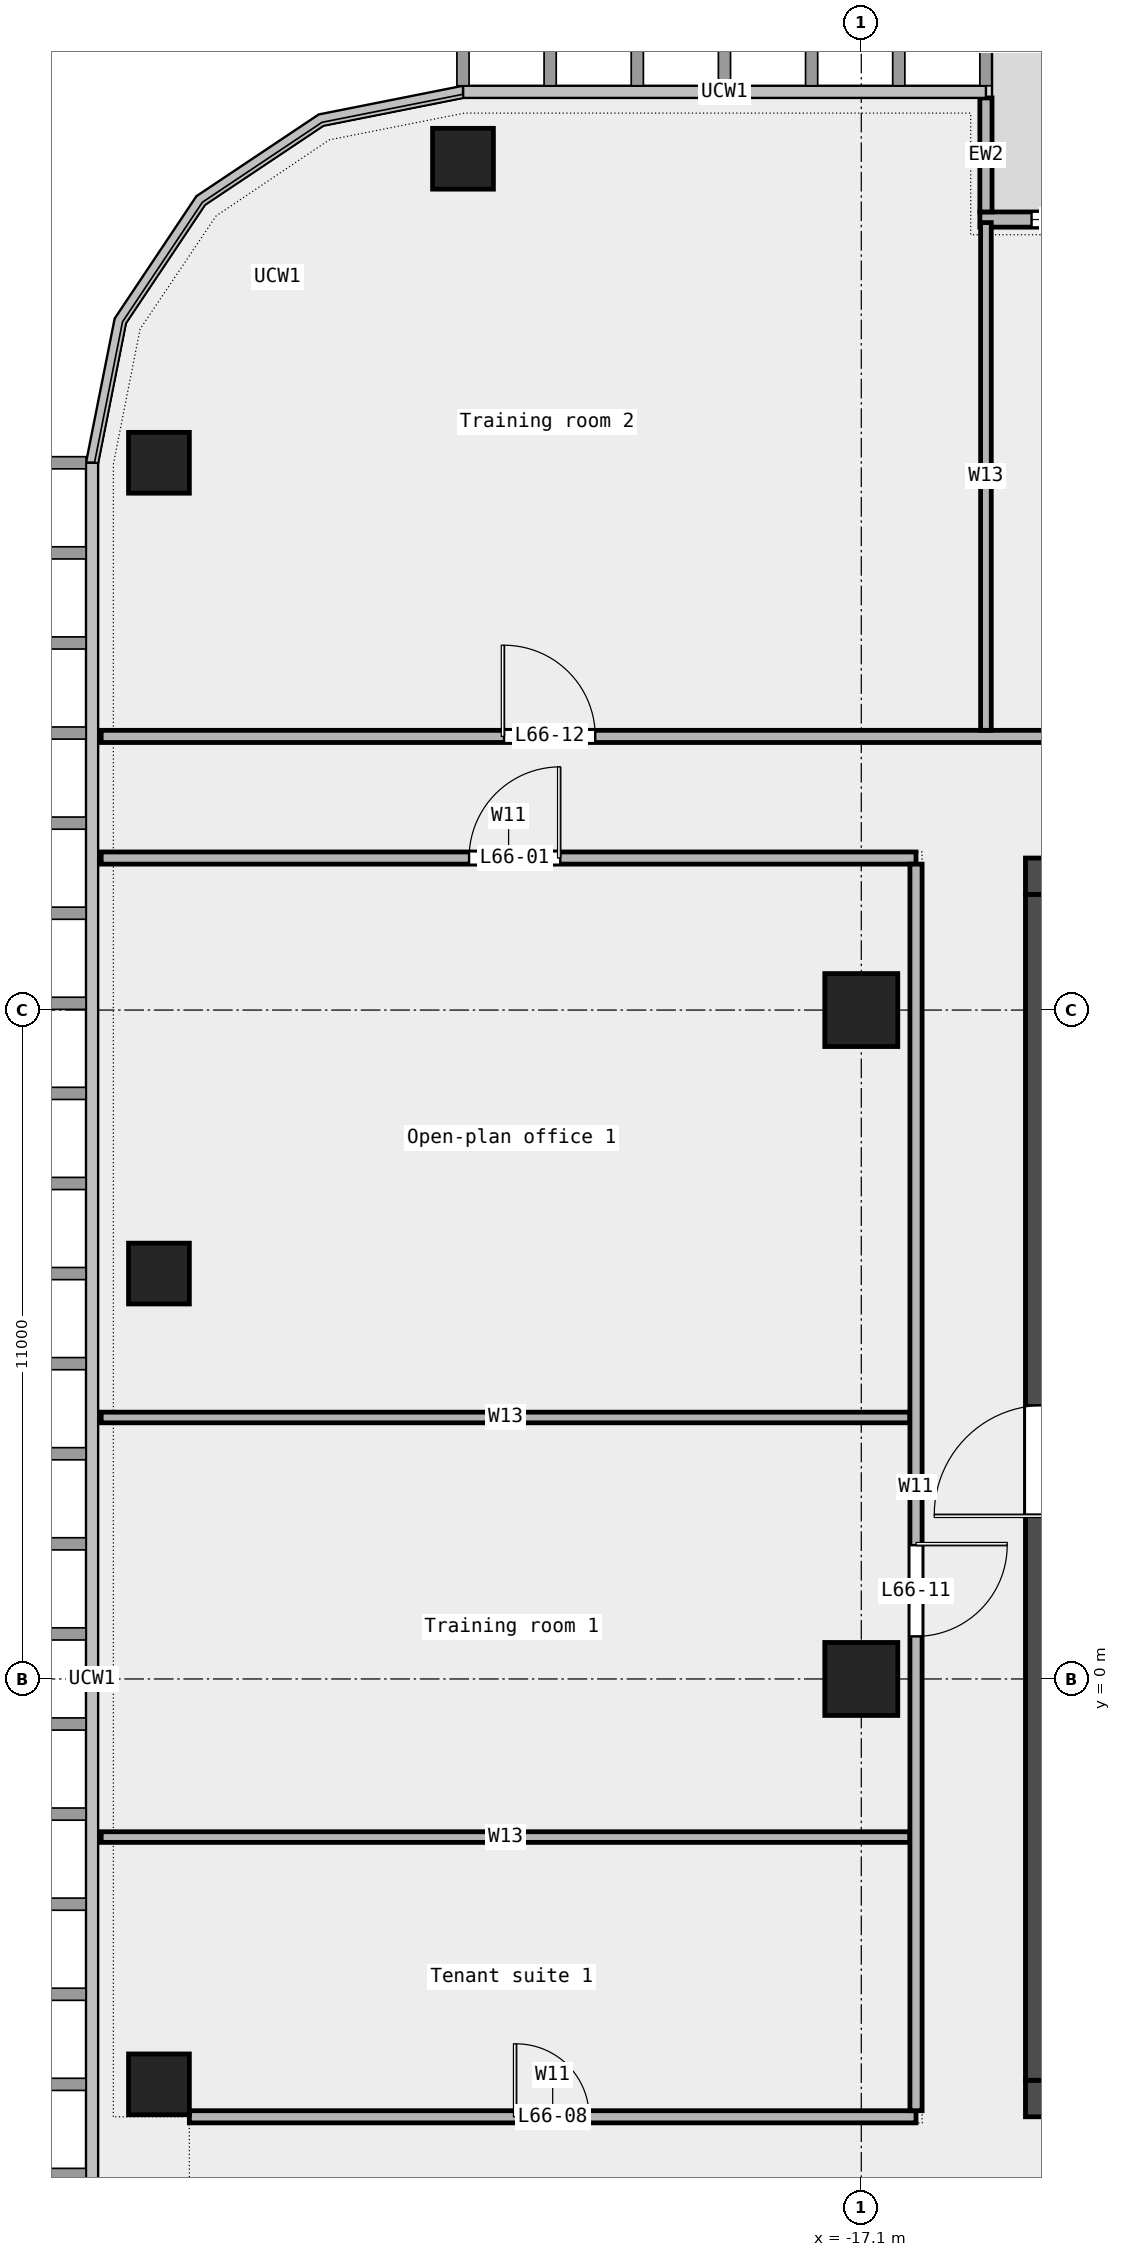
"""IFC4 building model, lengths in metres.
Left out: names, types, materials, properties, quantities, classifications, styles, units other than length and angle.
Written with IfcOpenShell. Run it as: python <this file> out.ifc"""

import sys

from ifc_helpers import new_model, si_unit, direction, frame, frame_2d, origin, origin_2d, place, context, subcontext, project, spatial, rectangle, extrude, element, fill, save


model = new_model("IFC4")
c1 = context("Model", 3, precision=1e-05, world=origin(), true_north=direction((0.0, 1.0)))
c2 = subcontext(c1, "Body", "Model", "MODEL_VIEW")
j1 = project(units=[si_unit("LENGTHUNIT", "METRE"), si_unit("PLANEANGLEUNIT", "RADIAN")], contexts=[c1])
p1 = place(None, origin())
s1 = spatial("IfcSite", under=j1, at=p1, CompositionType="ELEMENT")
p2 = place(p1, origin())
s2 = spatial("IfcBuilding", under=s1, at=p2, CompositionType="ELEMENT")
p3 = place(p2, frame((0.0, 0.0, 303.4)))
s3 = spatial("IfcBuildingStorey", under=s2, at=p3, CompositionType="ELEMENT", Elevation=303.4)
for number, where, z_axis, x_axis in (
    (1, (-23.65, 25.0, 0.0), (0.0, 0.0, 1.0), (1.0, 0.0, 0.0)),
    (2, (-28.65, 20.0, 0.0), (0.0, 0.0, 1.0), (1.0, 0.0, 0.0)),
    (3, (-28.65, 6.667, 0.0), (0.0, 0.0, 1.0), (1.0, 0.0, 0.0)),
    (4, (-28.65, -6.667, 0.0), (0.0, 0.0, 1.0), (1.0, 0.0, 0.0)),
):
    element("IfcColumn", number, at=place(p3, frame(where, z_axis=z_axis, x_axis=x_axis)), inside=s3, PredefinedType="COLUMN", context=c2, shape_type="SweptSolid", body=[
        extrude(rectangle(XDim=1.0, YDim=1.0, at=origin_2d()), origin(), (0.0, 0.0, 1.0), 3.6),
    ])
for number, where, z_axis, x_axis in (
    (5, (-17.1, 0.0, 0.0), (0.0, 0.0, 1.0), (1.0, 0.0, 0.0)),
    (6, (-17.1, 11.0, 0.0), (0.0, 0.0, 1.0), (1.0, 0.0, 0.0)),
):
    element("IfcColumn", number, at=place(p3, frame(where, z_axis=z_axis, x_axis=x_axis)), inside=s3, PredefinedType="COLUMN", context=c2, shape_type="SweptSolid", body=[
        extrude(rectangle(XDim=1.2, YDim=1.2, at=origin_2d()), origin(), (0.0, 0.0, 1.0), 3.6),
    ])
p4 = place(p3, frame((-2.05, 24.0, 0.0), z_axis=(0.0, 0.0, 1.0), x_axis=(-1.0, 0.0, 0.0)))
e7 = element("IfcWall", 7, at=p4, inside=s3, PredefinedType="STANDARD", context=c2, shape_type="SweptSolid", body=[
    extrude(rectangle(XDim=13.1, YDim=0.25, at=frame_2d((6.55, 0.0))), origin(), (0.0, 0.0, 1.0), 3.6),
])
p5 = place(p4, frame((1.5, 0.0, 0.45)))
e8 = element("IfcOpeningElement", 8, at=p5, cuts=e7, PredefinedType="OPENING", context=c2, shape_type="SweptSolid", body=[
    extrude(rectangle(XDim=1.5, YDim=2.4, at=frame_2d((0.75, 1.2))), frame((0.0, 0.137, 0.0), z_axis=(0.0, -1.0, 0.0), x_axis=(1.0, 0.0, 0.0)), (0.0, 0.0, 1.0), 0.274),
])
p6 = place(p4, frame((5.75, 0.0, 0.0)))
e9 = element("IfcOpeningElement", 9, at=p6, cuts=e7, PredefinedType="OPENING", context=c2, shape_type="SweptSolid", body=[
    extrude(rectangle(XDim=1.8, YDim=2.4, at=frame_2d((0.9, 1.2))), frame((0.0, 0.137, 0.0), z_axis=(0.0, -1.0, 0.0), x_axis=(1.0, 0.0, 0.0)), (0.0, 0.0, 1.0), 0.274),
])
p7 = place(p4, frame((10.75, 0.0, 0.45)))
e10 = element("IfcOpeningElement", 10, at=p7, cuts=e7, PredefinedType="OPENING", context=c2, shape_type="SweptSolid", body=[
    extrude(rectangle(XDim=1.5, YDim=2.4, at=frame_2d((0.75, 1.2))), frame((0.0, 0.137, 0.0), z_axis=(0.0, -1.0, 0.0), x_axis=(1.0, 0.0, 0.0)), (0.0, 0.0, 1.0), 0.274),
])
p8 = place(p3, frame((-15.05, 26.0, 0.0), z_axis=(0.0, 0.0, 1.0), x_axis=(0.0, -1.0, 0.0)))
e11 = element("IfcWall", 11, at=p8, inside=s3, PredefinedType="STANDARD", context=c2, shape_type="SweptSolid", body=[
    extrude(rectangle(XDim=1.875, YDim=0.2, at=frame_2d((0.938, 0.0))), origin(), (0.0, 0.0, 1.0), 3.6),
])
p9 = place(p3, frame((-28.15, -7.2, 0.0), z_axis=(0.0, 0.0, 1.0), x_axis=(1.0, 0.0, 0.0)))
e12 = element("IfcWall", 12, at=p9, inside=s3, PredefinedType="PARTITIONING", context=c2, shape_type="SweptSolid", body=[
    extrude(rectangle(XDim=11.95, YDim=0.2, at=frame_2d((5.975, 0.0))), origin(), (0.0, 0.0, 1.0), 3.6),
])
p10 = place(p9, frame((5.375, 0.0, 0.0)))
e13 = element("IfcOpeningElement", 13, at=p10, cuts=e12, PredefinedType="OPENING", context=c2, shape_type="SweptSolid", body=[
    extrude(rectangle(XDim=1.2, YDim=2.1, at=frame_2d((0.6, 1.05))), frame((0.0, 0.112, 0.0), z_axis=(0.0, -1.0, 0.0), x_axis=(1.0, 0.0, 0.0)), (0.0, 0.0, 1.0), 0.224),
])
for number, where, z_axis, x_axis in (
    (14, (-29.6, -2.6, 0.0), (0.0, 0.0, 1.0), (1.0, 0.0, 0.0)),
    (15, (-29.6, 4.3, 0.0), (0.0, 0.0, 1.0), (1.0, 0.0, 0.0)),
):
    element("IfcWall", number, at=place(p3, frame(where, z_axis=z_axis, x_axis=x_axis)), inside=s3, PredefinedType="PARTITIONING", context=c2, shape_type="SweptSolid", body=[
        extrude(rectangle(XDim=13.3, YDim=0.175, at=frame_2d((6.65, 0.0))), origin(), (0.0, 0.0, 1.0), 3.6),
    ])
p11 = place(p3, frame((-29.6, 13.5, 0.0), z_axis=(0.0, 0.0, 1.0), x_axis=(1.0, 0.0, 0.0)))
e16 = element("IfcWall", 16, at=p11, inside=s3, PredefinedType="PARTITIONING", context=c2, shape_type="SweptSolid", body=[
    extrude(rectangle(XDim=13.4, YDim=0.2, at=frame_2d((6.7, 0.0))), origin(), (0.0, 0.0, 1.0), 3.6),
])
p12 = place(p11, frame((6.05, 0.0, 0.0)))
e17 = element("IfcOpeningElement", 17, at=p12, cuts=e16, PredefinedType="OPENING", context=c2, shape_type="SweptSolid", body=[
    extrude(rectangle(XDim=1.5, YDim=2.1, at=frame_2d((0.75, 1.05))), frame((0.0, 0.112, 0.0), z_axis=(0.0, -1.0, 0.0), x_axis=(1.0, 0.0, 0.0)), (0.0, 0.0, 1.0), 0.224),
])
p13 = place(p3, frame((-29.6, 15.5, 0.0), z_axis=(0.0, 0.0, 1.0), x_axis=(1.0, 0.0, 0.0)))
e18 = element("IfcWall", 18, at=p13, inside=s3, PredefinedType="PARTITIONING", context=c2, shape_type="SweptSolid", body=[
    extrude(rectangle(XDim=59.2, YDim=0.2, at=frame_2d((29.6, 0.0))), origin(), (0.0, 0.0, 1.0), 3.6),
])
p14 = place(p13, frame((20.25, 0.0, 0.0)))
e19 = element("IfcOpeningElement", 19, at=p14, cuts=e18, PredefinedType="OPENING", context=c2, shape_type="SweptSolid", body=[
    extrude(rectangle(XDim=1.5, YDim=2.1, at=frame_2d((0.75, 1.05))), frame((0.0, 0.112, 0.0), z_axis=(0.0, -1.0, 0.0), x_axis=(1.0, 0.0, 0.0)), (0.0, 0.0, 1.0), 0.224),
])
p15 = place(p13, frame((49.825, 0.0, 0.0)))
e20 = element("IfcOpeningElement", 20, at=p15, cuts=e18, PredefinedType="OPENING", context=c2, shape_type="SweptSolid", body=[
    extrude(rectangle(XDim=1.8, YDim=2.1, at=frame_2d((0.9, 1.05))), frame((0.0, 0.112, 0.0), z_axis=(0.0, -1.0, 0.0), x_axis=(1.0, 0.0, 0.0)), (0.0, 0.0, 1.0), 0.224),
])
p16 = place(p13, frame((34.05, 0.0, 0.0)))
e21 = element("IfcOpeningElement", 21, at=p16, cuts=e18, PredefinedType="OPENING", context=c2, shape_type="SweptSolid", body=[
    extrude(rectangle(XDim=1.8, YDim=2.1, at=frame_2d((0.9, 1.05))), frame((0.0, 0.112, 0.0), z_axis=(0.0, -1.0, 0.0), x_axis=(1.0, 0.0, 0.0)), (0.0, 0.0, 1.0), 0.224),
])
p17 = place(p13, frame((6.625, 0.0, 0.0)))
e22 = element("IfcOpeningElement", 22, at=p17, cuts=e18, PredefinedType="OPENING", context=c2, shape_type="SweptSolid", body=[
    extrude(rectangle(XDim=1.5, YDim=2.1, at=frame_2d((0.75, 1.05))), frame((0.0, 0.112, 0.0), z_axis=(0.0, -1.0, 0.0), x_axis=(1.0, 0.0, 0.0)), (0.0, 0.0, 1.0), 0.224),
])
p18 = place(p3, frame((-16.2, -7.1, 0.0), z_axis=(0.0, 0.0, 1.0), x_axis=(0.0, 1.0, 0.0)))
e23 = element("IfcWall", 23, at=p18, inside=s3, PredefinedType="PARTITIONING", context=c2, shape_type="SweptSolid", body=[
    extrude(rectangle(XDim=20.5, YDim=0.2, at=frame_2d((10.25, 0.0))), origin(), (0.0, 0.0, 1.0), 3.6),
])
p19 = place(p18, frame((7.8, 0.0, 0.0)))
e24 = element("IfcOpeningElement", 24, at=p19, cuts=e23, PredefinedType="OPENING", context=c2, shape_type="SweptSolid", body=[
    extrude(rectangle(XDim=1.5, YDim=2.1, at=frame_2d((0.75, 1.05))), frame((0.0, 0.112, 0.0), z_axis=(0.0, -1.0, 0.0), x_axis=(1.0, 0.0, 0.0)), (0.0, 0.0, 1.0), 0.224),
])
p20 = place(p3, frame((-15.05, 15.6, 0.0), z_axis=(0.0, 0.0, 1.0), x_axis=(0.0, 1.0, 0.0)))
e25 = element("IfcWall", 25, at=p20, inside=s3, PredefinedType="PARTITIONING", context=c2, shape_type="SweptSolid", body=[
    extrude(rectangle(XDim=8.35, YDim=0.175, at=frame_2d((4.175, 0.0))), origin(), (0.0, 0.0, 1.0), 3.6),
])
p21 = place(p3, frame((-14.4, -6.9, 0.0), z_axis=(0.0, 0.0, 1.0), x_axis=(1.0, 0.0, 0.0)))
e26 = element("IfcWall", 26, at=p21, inside=s3, PredefinedType="SHEAR", context=c2, shape_type="SweptSolid", body=[
    extrude(rectangle(XDim=28.8, YDim=0.6, at=frame_2d((14.4, 0.0))), origin(), (0.0, 0.0, 1.0), 3.7),
])
p22 = place(p21, frame((4.337, 0.0, 0.0)))
e27 = element("IfcOpeningElement", 27, at=p22, cuts=e26, PredefinedType="OPENING", context=c2, shape_type="SweptSolid", body=[
    extrude(rectangle(XDim=1.0, YDim=2.1, at=frame_2d((0.5, 1.05))), frame((0.0, 0.312, 0.0), z_axis=(0.0, -1.0, 0.0), x_axis=(1.0, 0.0, 0.0)), (0.0, 0.0, 1.0), 0.624),
])
p23 = place(p21, frame((6.212, 0.0, 0.0)))
e28 = element("IfcOpeningElement", 28, at=p23, cuts=e26, PredefinedType="OPENING", context=c2, shape_type="SweptSolid", body=[
    extrude(rectangle(XDim=1.0, YDim=2.1, at=frame_2d((0.5, 1.05))), frame((0.0, 0.312, 0.0), z_axis=(0.0, -1.0, 0.0), x_axis=(1.0, 0.0, 0.0)), (0.0, 0.0, 1.0), 0.624),
])
p24 = place(p21, frame((10.8, 0.0, 0.0)))
e29 = element("IfcOpeningElement", 29, at=p24, cuts=e26, PredefinedType="OPENING", context=c2, shape_type="SweptSolid", body=[
    extrude(rectangle(XDim=1.2, YDim=2.1, at=frame_2d((0.6, 1.05))), frame((0.0, 0.312, 0.0), z_axis=(0.0, -1.0, 0.0), x_axis=(1.0, 0.0, 0.0)), (0.0, 0.0, 1.0), 0.624),
])
p25 = place(p21, frame((15.587, 0.0, 0.0)))
e30 = element("IfcOpeningElement", 30, at=p25, cuts=e26, PredefinedType="OPENING", context=c2, shape_type="SweptSolid", body=[
    extrude(rectangle(XDim=1.0, YDim=2.1, at=frame_2d((0.5, 1.05))), frame((0.0, 0.312, 0.0), z_axis=(0.0, -1.0, 0.0), x_axis=(1.0, 0.0, 0.0)), (0.0, 0.0, 1.0), 0.624),
])
p26 = place(p21, frame((18.75, 0.0, 0.0)))
e31 = element("IfcOpeningElement", 31, at=p26, cuts=e26, PredefinedType="OPENING", context=c2, shape_type="SweptSolid", body=[
    extrude(rectangle(XDim=1.8, YDim=2.1, at=frame_2d((0.9, 1.05))), frame((0.0, 0.312, 0.0), z_axis=(0.0, -1.0, 0.0), x_axis=(1.0, 0.0, 0.0)), (0.0, 0.0, 1.0), 0.624),
])
p27 = place(p21, frame((23.087, 0.0, 0.0)))
e32 = element("IfcOpeningElement", 32, at=p27, cuts=e26, PredefinedType="OPENING", context=c2, shape_type="SweptSolid", body=[
    extrude(rectangle(XDim=1.0, YDim=2.1, at=frame_2d((0.5, 1.05))), frame((0.0, 0.312, 0.0), z_axis=(0.0, -1.0, 0.0), x_axis=(1.0, 0.0, 0.0)), (0.0, 0.0, 1.0), 0.624),
])
p28 = place(p3, frame((-14.4, 13.2, 0.0), z_axis=(0.0, 0.0, 1.0), x_axis=(1.0, 0.0, 0.0)))
e33 = element("IfcWall", 33, at=p28, inside=s3, PredefinedType="SHEAR", context=c2, shape_type="SweptSolid", body=[
    extrude(rectangle(XDim=28.8, YDim=0.6, at=frame_2d((14.4, 0.0))), origin(), (0.0, 0.0, 1.0), 3.7),
])
p29 = place(p28, frame((6.3, 0.0, 0.0)))
e34 = element("IfcOpeningElement", 34, at=p29, cuts=e33, PredefinedType="OPENING", context=c2, shape_type="SweptSolid", body=[
    extrude(rectangle(XDim=1.2, YDim=2.1, at=frame_2d((0.6, 1.05))), frame((0.0, 0.312, 0.0), z_axis=(0.0, -1.0, 0.0), x_axis=(1.0, 0.0, 0.0)), (0.0, 0.0, 1.0), 0.624),
])
p30 = place(p28, frame((21.3, 0.0, 0.0)))
e35 = element("IfcOpeningElement", 35, at=p30, cuts=e33, PredefinedType="OPENING", context=c2, shape_type="SweptSolid", body=[
    extrude(rectangle(XDim=1.2, YDim=2.1, at=frame_2d((0.6, 1.05))), frame((0.0, 0.312, 0.0), z_axis=(0.0, -1.0, 0.0), x_axis=(1.0, 0.0, 0.0)), (0.0, 0.0, 1.0), 0.624),
])
p31 = place(p3, frame((-14.1, -6.6, 0.0), z_axis=(0.0, 0.0, 1.0), x_axis=(0.0, 1.0, 0.0)))
e36 = element("IfcWall", 36, at=p31, inside=s3, PredefinedType="SHEAR", context=c2, shape_type="SweptSolid", body=[
    extrude(rectangle(XDim=19.5, YDim=0.6, at=frame_2d((9.75, 0.0))), origin(), (0.0, 0.0, 1.0), 3.7),
])
p32 = place(p31, frame((9.3, 0.0, 0.0)))
e37 = element("IfcOpeningElement", 37, at=p32, cuts=e36, PredefinedType="OPENING", context=c2, shape_type="SweptSolid", body=[
    extrude(rectangle(XDim=1.8, YDim=2.1, at=frame_2d((0.9, 1.05))), frame((0.0, 0.312, 0.0), z_axis=(0.0, -1.0, 0.0), x_axis=(1.0, 0.0, 0.0)), (0.0, 0.0, 1.0), 0.624),
])
p33 = place(p7, origin())
e38 = element("IfcWindow", 38, at=p33, inside=s3, PartitioningType="SINGLE_PANEL", PredefinedType="WINDOW", context=c2, shape_type="SweptSolid", body=[
    extrude(rectangle(XDim=1.5, YDim=2.4, at=frame_2d((0.75, 1.2))), frame((0.0, 0.03, 0.0), z_axis=(0.0, -1.0, 0.0), x_axis=(1.0, 0.0, 0.0)), (0.0, 0.0, 1.0), 0.06),
])
fill(e10, e38)
p34 = place(p12, origin())
e39 = element("IfcDoor", 39, at=p34, inside=s3, OperationType="DOUBLE_DOOR_SINGLE_SWING", PredefinedType="DOOR", context=c2, shape_type="SweptSolid", body=[
    extrude(rectangle(XDim=1.5, YDim=2.1, at=frame_2d((0.75, 1.05))), frame((0.0, 0.025, 0.0), z_axis=(0.0, -1.0, 0.0), x_axis=(1.0, 0.0, 0.0)), (0.0, 0.0, 1.0), 0.05),
])
fill(e17, e39)
p35 = place(p10, origin())
e40 = element("IfcDoor", 40, at=p35, inside=s3, OperationType="SINGLE_SWING_LEFT", PredefinedType="DOOR", context=c2, shape_type="SweptSolid", body=[
    extrude(rectangle(XDim=1.2, YDim=2.1, at=frame_2d((0.6, 1.05))), frame((0.0, 0.025, 0.0), z_axis=(0.0, -1.0, 0.0), x_axis=(1.0, 0.0, 0.0)), (0.0, 0.0, 1.0), 0.05),
])
fill(e13, e40)
p36 = place(p19, origin())
e41 = element("IfcDoor", 41, at=p36, inside=s3, OperationType="DOUBLE_DOOR_SINGLE_SWING", PredefinedType="DOOR", context=c2, shape_type="SweptSolid", body=[
    extrude(rectangle(XDim=1.5, YDim=2.1, at=frame_2d((0.75, 1.05))), frame((0.0, 0.025, 0.0), z_axis=(0.0, -1.0, 0.0), x_axis=(1.0, 0.0, 0.0)), (0.0, 0.0, 1.0), 0.05),
])
fill(e24, e41)
p37 = place(p17, origin())
e42 = element("IfcDoor", 42, at=p37, inside=s3, OperationType="DOUBLE_DOOR_SINGLE_SWING", PredefinedType="DOOR", context=c2, shape_type="SweptSolid", body=[
    extrude(rectangle(XDim=1.5, YDim=2.1, at=frame_2d((0.75, 1.05))), frame((0.0, 0.025, 0.0), z_axis=(0.0, -1.0, 0.0), x_axis=(1.0, 0.0, 0.0)), (0.0, 0.0, 1.0), 0.05),
])
fill(e22, e42)
save(model, sys.argv[1])
